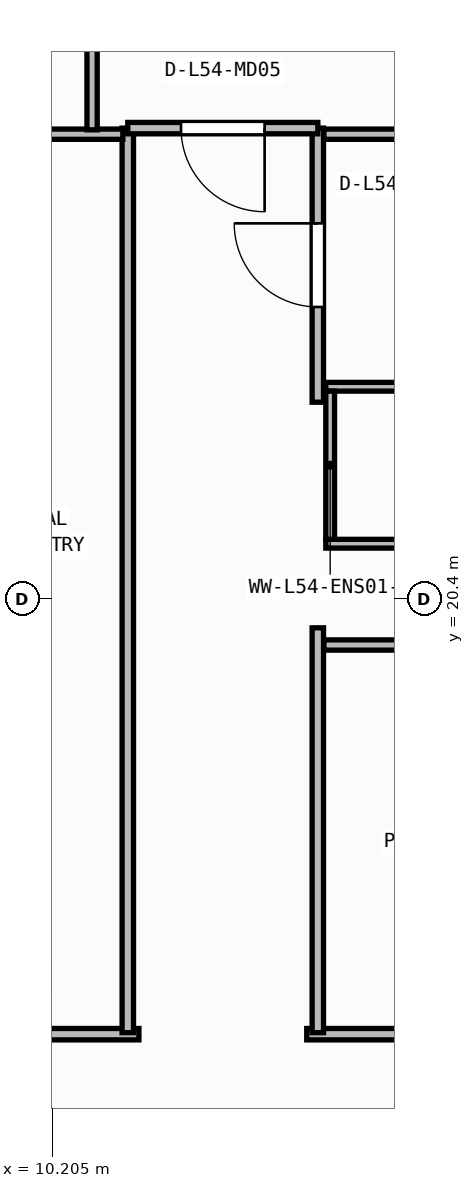
"""IFC4 building model, lengths in metres.
Left out: names, types, materials, properties, quantities, classifications, styles, units other than length and angle.
Written with IfcOpenShell. Run it as: python <this file> out.ifc"""

import sys

from ifc_helpers import new_model, si_unit, direction, frame, frame_2d, origin, place, context, subcontext, project, spatial, rectangle, extrude, element, fill, save


model = new_model("IFC4")
c1 = context("Model", 3, precision=1e-05, world=origin(), true_north=direction((0.0, 1.0)))
c2 = subcontext(c1, "Body", "Model", "MODEL_VIEW")
j1 = project(units=[si_unit("LENGTHUNIT", "METRE"), si_unit("PLANEANGLEUNIT", "RADIAN")], contexts=[c1])
p1 = place(None, origin())
s1 = spatial("IfcSite", under=j1, at=p1, CompositionType="ELEMENT")
p2 = place(p1, origin())
s2 = spatial("IfcBuilding", under=s1, at=p2, CompositionType="ELEMENT")
p3 = place(p2, frame((0.0, 0.0, 219.75)))
s3 = spatial("IfcBuildingStorey", under=s2, at=p3, CompositionType="ELEMENT", Elevation=219.75)
for number, where, z_axis, x_axis in (
    (1, (13.805, 21.133, 0.0), (0.0, 0.0, 1.0), (1.0, 0.0, 0.0)),
    (2, (13.805, 23.198, 0.0), (0.0, 0.0, 1.0), (1.0, 0.0, 0.0)),
):
    element("IfcWall", number, at=place(p3, frame(where, z_axis=z_axis, x_axis=x_axis)), inside=s3, PredefinedType="PARTITIONING", context=c2, shape_type="SweptSolid", body=[
        extrude(rectangle(XDim=2.15, YDim=0.115, at=frame_2d((1.075, 0.0))), origin(), (0.0, 0.0, 1.0), 3.71),
    ])
p4 = place(p3, frame((13.863, 21.19, 0.0), z_axis=(0.0, 0.0, 1.0), x_axis=(0.0, 1.0, 0.0)))
e3 = element("IfcWall", 3, at=p4, inside=s3, PredefinedType="PARTITIONING", context=c2, shape_type="SweptSolid", body=[
    extrude(rectangle(XDim=1.95, YDim=0.115, at=frame_2d((0.975, 0.0))), origin(), (0.0, 0.0, 1.0), 3.71),
])
p5 = place(p3, frame((11.346, 14.68, 0.0), z_axis=(0.0, 0.0, 1.0), x_axis=(-1.0, 0.0, 0.0)))
e4 = element("IfcWall", 4, at=p5, inside=s3, PredefinedType="PARTITIONING", context=c2, shape_type="SweptSolid", body=[
    extrude(rectangle(XDim=3.872, YDim=0.15, at=frame_2d((1.936, 0.0))), origin(), (0.0, 0.0, 1.0), 3.71),
])
p6 = place(p5, frame((1.386, 0.0, 0.0)))
e5 = element("IfcOpeningElement", 5, at=p6, cuts=e4, PredefinedType="OPENING", context=c2, shape_type="SweptSolid", body=[
    extrude(rectangle(XDim=1.1, YDim=2.1, at=frame_2d((0.55, 1.05))), frame((0.0, 0.085, 0.0), z_axis=(0.0, -1.0, 0.0), x_axis=(1.0, 0.0, 0.0)), (0.0, 0.0, 1.0), 0.17),
])
p7 = place(p3, frame((34.766, 14.68, 0.0), z_axis=(0.0, 0.0, 1.0), x_axis=(-1.0, 0.0, 0.0)))
e6 = element("IfcWall", 6, at=p7, inside=s3, PredefinedType="PARTITIONING", context=c2, shape_type="SweptSolid", body=[
    extrude(rectangle(XDim=21.212, YDim=0.15, at=frame_2d((10.606, 0.0))), origin(), (0.0, 0.0, 1.0), 3.71),
])
p8 = place(p7, frame((10.056, 0.0, 0.0)))
e7 = element("IfcOpeningElement", 7, at=p8, cuts=e6, PredefinedType="OPENING", context=c2, shape_type="SweptSolid", body=[
    extrude(rectangle(XDim=1.1, YDim=2.1, at=frame_2d((0.55, 1.05))), frame((0.0, 0.085, 0.0), z_axis=(0.0, -1.0, 0.0), x_axis=(1.0, 0.0, 0.0)), (0.0, 0.0, 1.0), 0.17),
])
p9 = place(p3, frame((11.2, 26.6, 0.0), z_axis=(0.0, 0.0, 1.0), x_axis=(0.0, -1.0, 0.0)))
e8 = element("IfcWall", 8, at=p9, inside=s3, PredefinedType="PARTITIONING", context=c2, shape_type="SweptSolid", body=[
    extrude(rectangle(XDim=11.9, YDim=0.15, at=frame_2d((5.95, 0.0))), origin(), (0.0, 0.0, 1.0), 3.71),
])
p10 = place(p3, frame((13.7, 14.7, 0.0), z_axis=(0.0, 0.0, 1.0), x_axis=(0.0, 1.0, 0.0)))
e9 = element("IfcWall", 9, at=p10, inside=s3, PredefinedType="PARTITIONING", context=c2, shape_type="SweptSolid", body=[
    extrude(rectangle(XDim=5.326, YDim=0.15, at=frame_2d((2.663, 0.0))), origin(), (0.0, 0.0, 1.0), 3.71),
])
p11 = place(p3, frame((13.7, 22.994, 0.0), z_axis=(0.0, 0.0, 1.0), x_axis=(0.0, 1.0, 0.0)))
e10 = element("IfcWall", 10, at=p11, inside=s3, PredefinedType="PARTITIONING", context=c2, shape_type="SweptSolid", body=[
    extrude(rectangle(XDim=3.606, YDim=0.15, at=frame_2d((1.803, 0.0))), origin(), (0.0, 0.0, 1.0), 3.71),
])
p12 = place(p11, frame((1.253, 0.0, 0.0)))
e11 = element("IfcOpeningElement", 11, at=p12, cuts=e10, PredefinedType="OPENING", context=c2, shape_type="SweptSolid", body=[
    extrude(rectangle(XDim=1.1, YDim=2.1, at=frame_2d((0.55, 1.05))), frame((0.0, 0.085, 0.0), z_axis=(0.0, -1.0, 0.0), x_axis=(1.0, 0.0, 0.0)), (0.0, 0.0, 1.0), 0.17),
])
p13 = place(p3, frame((13.7, 26.6, 0.0), z_axis=(0.0, 0.0, 1.0), x_axis=(-1.0, 0.0, 0.0)))
e12 = element("IfcWall", 12, at=p13, inside=s3, PredefinedType="PARTITIONING", context=c2, shape_type="SweptSolid", body=[
    extrude(rectangle(XDim=2.5, YDim=0.15, at=frame_2d((1.25, 0.0))), origin(), (0.0, 0.0, 1.0), 3.71),
])
p14 = place(p13, frame((0.7, 0.0, 0.0)))
e13 = element("IfcOpeningElement", 13, at=p14, cuts=e12, PredefinedType="OPENING", context=c2, shape_type="SweptSolid", body=[
    extrude(rectangle(XDim=1.1, YDim=2.1, at=frame_2d((0.55, 1.05))), frame((0.0, 0.085, 0.0), z_axis=(0.0, -1.0, 0.0), x_axis=(1.0, 0.0, 0.0)), (0.0, 0.0, 1.0), 0.17),
])
p15 = place(p3, frame((11.135, 26.52, 0.0), z_axis=(0.0, 0.0, 1.0), x_axis=(-1.0, 0.0, 0.0)))
e14 = element("IfcWall", 14, at=p15, inside=s3, PredefinedType="PARTITIONING", context=c2, shape_type="SweptSolid", body=[
    extrude(rectangle(XDim=3.498, YDim=0.135, at=frame_2d((1.749, 0.0))), origin(), (0.0, 0.0, 1.0), 3.71),
])
p16 = place(p3, frame((18.515, 19.8, 0.0), z_axis=(0.0, 0.0, 1.0), x_axis=(-1.0, 0.0, 0.0)))
e15 = element("IfcWall", 15, at=p16, inside=s3, PredefinedType="PARTITIONING", context=c2, shape_type="SweptSolid", body=[
    extrude(rectangle(XDim=4.735, YDim=0.135, at=frame_2d((2.367, 0.0))), origin(), (0.0, 0.0, 1.0), 3.71),
])
p17 = place(p3, frame((15.594, 26.52, 0.0), z_axis=(0.0, 0.0, 1.0), x_axis=(-1.0, 0.0, 0.0)))
e16 = element("IfcWall", 16, at=p17, inside=s3, PredefinedType="PARTITIONING", context=c2, shape_type="SweptSolid", body=[
    extrude(rectangle(XDim=1.814, YDim=0.135, at=frame_2d((0.907, 0.0))), origin(), (0.0, 0.0, 1.0), 3.71),
])
p18 = place(p3, frame((10.73, 26.577, 0.0), z_axis=(0.0, 0.0, 1.0), x_axis=(0.0, 1.0, 0.0)))
e17 = element("IfcWall", 17, at=p18, inside=s3, PredefinedType="PARTITIONING", context=c2, shape_type="SweptSolid", body=[
    extrude(rectangle(XDim=10.386, YDim=0.135, at=frame_2d((5.193, 0.0))), origin(), (0.0, 0.0, 1.0), 3.71),
])
p19 = place(p12, origin())
e18 = element("IfcDoor", 18, at=p19, inside=s3, OperationType="SINGLE_SWING_RIGHT", PredefinedType="DOOR", context=c2, shape_type="SweptSolid", body=[
    extrude(rectangle(XDim=1.1, YDim=2.1, at=frame_2d((0.55, 1.05))), frame((0.0, 0.025, 0.0), z_axis=(0.0, -1.0, 0.0), x_axis=(1.0, 0.0, 0.0)), (0.0, 0.0, 1.0), 0.05),
])
fill(e11, e18)
p20 = place(p14, origin())
e19 = element("IfcDoor", 19, at=p20, inside=s3, OperationType="SINGLE_SWING_LEFT", PredefinedType="DOOR", context=c2, shape_type="SweptSolid", body=[
    extrude(rectangle(XDim=1.1, YDim=2.1, at=frame_2d((0.55, 1.05))), frame((0.0, 0.025, 0.0), z_axis=(0.0, -1.0, 0.0), x_axis=(1.0, 0.0, 0.0)), (0.0, 0.0, 1.0), 0.05),
])
fill(e13, e19)
save(model, sys.argv[1])
